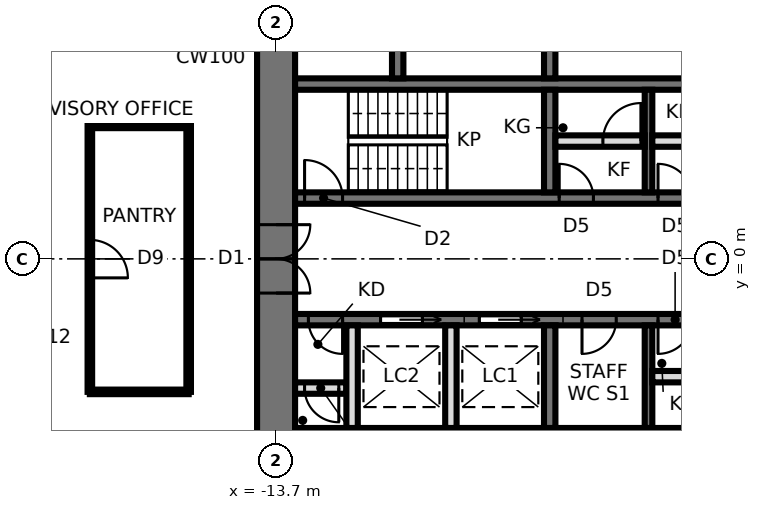
"""IFC4 building model, lengths in metres.
Left out: names, types, materials, properties, quantities, classifications, styles, units other than length and angle.
Written with IfcOpenShell. Run it as: python <this file> out.ifc"""

import sys

from ifc_helpers import new_model, si_unit, direction, frame, frame_2d, origin, place, context, subcontext, project, spatial, rectangle, extrude, element, fill, save


model = new_model("IFC4")
c1 = context("Model", 3, precision=1e-05, world=origin(), true_north=direction((0.0, 1.0)))
c2 = subcontext(c1, "Body", "Model", "MODEL_VIEW")
j1 = project(units=[si_unit("LENGTHUNIT", "METRE"), si_unit("PLANEANGLEUNIT", "RADIAN")], contexts=[c1])
p1 = place(None, origin())
s1 = spatial("IfcSite", under=j1, at=p1, CompositionType="ELEMENT")
p2 = place(p1, origin())
s2 = spatial("IfcBuilding", under=s1, at=p2, CompositionType="ELEMENT")
p3 = place(p2, frame((0.0, 0.0, 187.7)))
s3 = spatial("IfcBuildingStorey", under=s2, at=p3, CompositionType="ELEMENT", Elevation=187.7)
p4 = place(p3, frame((-13.7, 9.5, 0.0), z_axis=(0.0, 0.0, 1.0), x_axis=(0.0, -1.0, 0.0)))
e1 = element("IfcWall", 1, at=p4, inside=s3, PredefinedType="SHEAR", context=c2, shape_type="SweptSolid", body=[
    extrude(rectangle(XDim=19.0, YDim=1.0, at=frame_2d((9.5, 0.0))), origin(), (0.0, 0.0, 1.0), 3.9),
])
p5 = place(p4, frame((8.6, 0.0, 0.0)))
e2 = element("IfcOpeningElement", 2, at=p5, cuts=e1, PredefinedType="OPENING", context=c2, shape_type="SweptSolid", body=[
    extrude(rectangle(XDim=1.8, YDim=2.4, at=frame_2d((0.9, 1.2))), frame((0.0, 0.51, 0.0), z_axis=(0.0, -1.0, 0.0), x_axis=(1.0, 0.0, 0.0)), (0.0, 0.0, 1.0), 1.02),
])
p6 = place(p3, frame((-13.2, 1.6, 0.0), z_axis=(0.0, 0.0, 1.0), x_axis=(1.0, 0.0, 0.0)))
e3 = element("IfcWall", 3, at=p6, inside=s3, PredefinedType="SHEAR", context=c2, shape_type="SweptSolid", body=[
    extrude(rectangle(XDim=26.4, YDim=0.3, at=frame_2d((13.2, 0.0))), origin(), (0.0, 0.0, 1.0), 3.9),
])
p7 = place(p6, frame((0.25, 0.0, 0.0)))
e4 = element("IfcOpeningElement", 4, at=p7, cuts=e3, PredefinedType="OPENING", context=c2, shape_type="SweptSolid", body=[
    extrude(rectangle(XDim=1.0, YDim=2.1, at=frame_2d((0.5, 1.05))), frame((0.0, 0.16, 0.0), z_axis=(0.0, -1.0, 0.0), x_axis=(1.0, 0.0, 0.0)), (0.0, 0.0, 1.0), 0.32),
])
p8 = place(p6, frame((23.05, 0.0, 0.0)))
e5 = element("IfcOpeningElement", 5, at=p8, cuts=e3, PredefinedType="OPENING", context=c2, shape_type="SweptSolid", body=[
    extrude(rectangle(XDim=1.1, YDim=2.3, at=frame_2d((0.55, 1.15))), frame((0.0, 0.16, 0.0), z_axis=(0.0, -1.0, 0.0), x_axis=(1.0, 0.0, 0.0)), (0.0, 0.0, 1.0), 0.32),
])
p9 = place(p6, frame((20.25, 0.0, 0.0)))
e6 = element("IfcOpeningElement", 6, at=p9, cuts=e3, PredefinedType="OPENING", context=c2, shape_type="SweptSolid", body=[
    extrude(rectangle(XDim=1.5, YDim=2.4, at=frame_2d((0.75, 1.2))), frame((0.0, 0.16, 0.0), z_axis=(0.0, -1.0, 0.0), x_axis=(1.0, 0.0, 0.0)), (0.0, 0.0, 1.0), 0.32),
])
p10 = place(p6, frame((6.95, 0.0, 0.0)))
e7 = element("IfcOpeningElement", 7, at=p10, cuts=e3, PredefinedType="OPENING", context=c2, shape_type="SweptSolid", body=[
    extrude(rectangle(XDim=0.9, YDim=2.1, at=frame_2d((0.45, 1.05))), frame((0.0, 0.16, 0.0), z_axis=(0.0, -1.0, 0.0), x_axis=(1.0, 0.0, 0.0)), (0.0, 0.0, 1.0), 0.32),
])
p11 = place(p6, frame((9.55, 0.0, 0.0)))
e8 = element("IfcOpeningElement", 8, at=p11, cuts=e3, PredefinedType="OPENING", context=c2, shape_type="SweptSolid", body=[
    extrude(rectangle(XDim=0.9, YDim=2.1, at=frame_2d((0.45, 1.05))), frame((0.0, 0.16, 0.0), z_axis=(0.0, -1.0, 0.0), x_axis=(1.0, 0.0, 0.0)), (0.0, 0.0, 1.0), 0.32),
])
p12 = place(p6, frame((12.15, 0.0, 0.0)))
e9 = element("IfcOpeningElement", 9, at=p12, cuts=e3, PredefinedType="OPENING", context=c2, shape_type="SweptSolid", body=[
    extrude(rectangle(XDim=0.9, YDim=2.1, at=frame_2d((0.45, 1.05))), frame((0.0, 0.16, 0.0), z_axis=(0.0, -1.0, 0.0), x_axis=(1.0, 0.0, 0.0)), (0.0, 0.0, 1.0), 0.32),
])
p13 = place(p6, frame((25.45, 0.0, 0.0)))
e10 = element("IfcOpeningElement", 10, at=p13, cuts=e3, PredefinedType="OPENING", context=c2, shape_type="SweptSolid", body=[
    extrude(rectangle(XDim=0.9, YDim=2.1, at=frame_2d((0.45, 1.05))), frame((0.0, 0.16, 0.0), z_axis=(0.0, -1.0, 0.0), x_axis=(1.0, 0.0, 0.0)), (0.0, 0.0, 1.0), 0.32),
])
p14 = place(p3, frame((-13.2, -1.6, 0.0), z_axis=(0.0, 0.0, 1.0), x_axis=(1.0, 0.0, 0.0)))
e11 = element("IfcWall", 11, at=p14, inside=s3, PredefinedType="SHEAR", context=c2, shape_type="SweptSolid", body=[
    extrude(rectangle(XDim=26.4, YDim=0.3, at=frame_2d((13.2, 0.0))), origin(), (0.0, 0.0, 1.0), 3.9),
])
p15 = place(p14, frame((25.15, 0.0, 0.0)))
e12 = element("IfcOpeningElement", 12, at=p15, cuts=e11, PredefinedType="OPENING", context=c2, shape_type="SweptSolid", body=[
    extrude(rectangle(XDim=1.0, YDim=2.1, at=frame_2d((0.5, 1.05))), frame((0.0, 0.16, 0.0), z_axis=(0.0, -1.0, 0.0), x_axis=(1.0, 0.0, 0.0)), (0.0, 0.0, 1.0), 0.32),
])
p16 = place(p14, frame((7.55, 0.0, 0.0)))
e13 = element("IfcOpeningElement", 13, at=p16, cuts=e11, PredefinedType="OPENING", context=c2, shape_type="SweptSolid", body=[
    extrude(rectangle(XDim=0.9, YDim=2.1, at=frame_2d((0.45, 1.05))), frame((0.0, 0.16, 0.0), z_axis=(0.0, -1.0, 0.0), x_axis=(1.0, 0.0, 0.0)), (0.0, 0.0, 1.0), 0.32),
])
p17 = place(p14, frame((9.55, 0.0, 0.0)))
e14 = element("IfcOpeningElement", 14, at=p17, cuts=e11, PredefinedType="OPENING", context=c2, shape_type="SweptSolid", body=[
    extrude(rectangle(XDim=0.9, YDim=2.1, at=frame_2d((0.45, 1.05))), frame((0.0, 0.16, 0.0), z_axis=(0.0, -1.0, 0.0), x_axis=(1.0, 0.0, 0.0)), (0.0, 0.0, 1.0), 0.32),
])
p18 = place(p14, frame((12.15, 0.0, 0.0)))
e15 = element("IfcOpeningElement", 15, at=p18, cuts=e11, PredefinedType="OPENING", context=c2, shape_type="SweptSolid", body=[
    extrude(rectangle(XDim=0.9, YDim=2.1, at=frame_2d((0.45, 1.05))), frame((0.0, 0.16, 0.0), z_axis=(0.0, -1.0, 0.0), x_axis=(1.0, 0.0, 0.0)), (0.0, 0.0, 1.0), 0.32),
])
p19 = place(p14, frame((15.25, 0.0, 0.0)))
e16 = element("IfcOpeningElement", 16, at=p19, cuts=e11, PredefinedType="OPENING", context=c2, shape_type="SweptSolid", body=[
    extrude(rectangle(XDim=1.1, YDim=2.3, at=frame_2d((0.55, 1.15))), frame((0.0, 0.16, 0.0), z_axis=(0.0, -1.0, 0.0), x_axis=(1.0, 0.0, 0.0)), (0.0, 0.0, 1.0), 0.32),
])
p20 = place(p14, frame((17.85, 0.0, 0.0)))
e17 = element("IfcOpeningElement", 17, at=p20, cuts=e11, PredefinedType="OPENING", context=c2, shape_type="SweptSolid", body=[
    extrude(rectangle(XDim=1.1, YDim=2.3, at=frame_2d((0.55, 1.15))), frame((0.0, 0.16, 0.0), z_axis=(0.0, -1.0, 0.0), x_axis=(1.0, 0.0, 0.0)), (0.0, 0.0, 1.0), 0.32),
])
p21 = place(p14, frame((4.85, 0.0, 0.0)))
e18 = element("IfcOpeningElement", 18, at=p21, cuts=e11, PredefinedType="OPENING", context=c2, shape_type="SweptSolid", body=[
    extrude(rectangle(XDim=1.1, YDim=2.3, at=frame_2d((0.55, 1.15))), frame((0.0, 0.16, 0.0), z_axis=(0.0, -1.0, 0.0), x_axis=(1.0, 0.0, 0.0)), (0.0, 0.0, 1.0), 0.32),
])
p22 = place(p14, frame((2.25, 0.0, 0.0)))
e19 = element("IfcOpeningElement", 19, at=p22, cuts=e11, PredefinedType="OPENING", context=c2, shape_type="SweptSolid", body=[
    extrude(rectangle(XDim=1.1, YDim=2.3, at=frame_2d((0.55, 1.15))), frame((0.0, 0.16, 0.0), z_axis=(0.0, -1.0, 0.0), x_axis=(1.0, 0.0, 0.0)), (0.0, 0.0, 1.0), 0.32),
])
p23 = place(p14, frame((0.35, 0.0, 0.0)))
e20 = element("IfcOpeningElement", 20, at=p23, cuts=e11, PredefinedType="OPENING", context=c2, shape_type="SweptSolid", body=[
    extrude(rectangle(XDim=0.9, YDim=2.1, at=frame_2d((0.45, 1.05))), frame((0.0, 0.16, 0.0), z_axis=(0.0, -1.0, 0.0), x_axis=(1.0, 0.0, 0.0)), (0.0, 0.0, 1.0), 0.32),
])
for number, where, z_axis, x_axis in (
    (21, (-13.2, 4.6, 0.0), (0.0, 0.0, 1.0), (1.0, 0.0, 0.0)),
    (22, (-13.2, -4.6, 0.0), (0.0, 0.0, 1.0), (1.0, 0.0, 0.0)),
):
    element("IfcWall", number, at=place(p3, frame(where, z_axis=z_axis, x_axis=x_axis)), inside=s3, PredefinedType="SHEAR", context=c2, shape_type="SweptSolid", body=[
        extrude(rectangle(XDim=26.4, YDim=0.3, at=frame_2d((13.2, 0.0))), origin(), (0.0, 0.0, 1.0), 3.9),
    ])
p24 = place(p3, frame((-6.5, 1.75, 0.0), z_axis=(0.0, 0.0, 1.0), x_axis=(0.0, 1.0, 0.0)))
e23 = element("IfcWall", 23, at=p24, inside=s3, PredefinedType="SHEAR", context=c2, shape_type="SweptSolid", body=[
    extrude(rectangle(XDim=2.7, YDim=0.3, at=frame_2d((1.35, 0.0))), origin(), (0.0, 0.0, 1.0), 3.9),
])
p25 = place(p3, frame((-6.5, 4.75, 0.0), z_axis=(0.0, 0.0, 1.0), x_axis=(0.0, 1.0, 0.0)))
e24 = element("IfcWall", 24, at=p25, inside=s3, PredefinedType="SHEAR", context=c2, shape_type="SweptSolid", body=[
    extrude(rectangle(XDim=3.75, YDim=0.3, at=frame_2d((1.875, 0.0))), origin(), (0.0, 0.0, 1.0), 3.9),
])
p26 = place(p3, frame((-3.9, 1.75, 0.0), z_axis=(0.0, 0.0, 1.0), x_axis=(0.0, 1.0, 0.0)))
e25 = element("IfcWall", 25, at=p26, inside=s3, PredefinedType="SHEAR", context=c2, shape_type="SweptSolid", body=[
    extrude(rectangle(XDim=2.7, YDim=0.2, at=frame_2d((1.35, 0.0))), origin(), (0.0, 0.0, 1.0), 3.9),
])
p27 = place(p3, frame((-6.5, -1.75, 0.0), z_axis=(0.0, 0.0, 1.0), x_axis=(0.0, -1.0, 0.0)))
e26 = element("IfcWall", 26, at=p27, inside=s3, PredefinedType="SHEAR", context=c2, shape_type="SweptSolid", body=[
    extrude(rectangle(XDim=2.7, YDim=0.3, at=frame_2d((1.35, 0.0))), origin(), (0.0, 0.0, 1.0), 3.9),
])
p28 = place(p3, frame((-3.9, -1.75, 0.0), z_axis=(0.0, 0.0, 1.0), x_axis=(0.0, -1.0, 0.0)))
e27 = element("IfcWall", 27, at=p28, inside=s3, PredefinedType="SHEAR", context=c2, shape_type="SweptSolid", body=[
    extrude(rectangle(XDim=2.7, YDim=0.2, at=frame_2d((1.35, 0.0))), origin(), (0.0, 0.0, 1.0), 3.9),
])
p29 = place(p3, frame((-10.5, 4.75, 0.0), z_axis=(0.0, 0.0, 1.0), x_axis=(0.0, 1.0, 0.0)))
e28 = element("IfcWall", 28, at=p29, inside=s3, PredefinedType="SHEAR", context=c2, shape_type="SweptSolid", body=[
    extrude(rectangle(XDim=3.75, YDim=0.3, at=frame_2d((1.875, 0.0))), origin(), (0.0, 0.0, 1.0), 3.9),
])
p30 = place(p3, frame((-6.35, 3.1, 0.0), z_axis=(0.0, 0.0, 1.0), x_axis=(1.0, 0.0, 0.0)))
e29 = element("IfcWall", 29, at=p30, inside=s3, PredefinedType="PARTITIONING", context=c2, shape_type="SweptSolid", body=[
    extrude(rectangle(XDim=2.35, YDim=0.3, at=frame_2d((1.175, 0.0))), origin(), (0.0, 0.0, 1.0), 3.74),
])
p31 = place(p30, frame((1.25, 0.0, 0.0)))
e30 = element("IfcOpeningElement", 30, at=p31, cuts=e29, PredefinedType="OPENING", context=c2, shape_type="SweptSolid", body=[
    extrude(rectangle(XDim=1.0, YDim=2.4, at=frame_2d((0.5, 1.2))), frame((0.0, 0.16, 0.0), z_axis=(0.0, -1.0, 0.0), x_axis=(1.0, 0.0, 0.0)), (0.0, 0.0, 1.0), 0.32),
])
p32 = place(p3, frame((-3.8, 3.1, 0.0), z_axis=(0.0, 0.0, 1.0), x_axis=(1.0, 0.0, 0.0)))
e31 = element("IfcWall", 31, at=p32, inside=s3, PredefinedType="PARTITIONING", context=c2, shape_type="SweptSolid", body=[
    extrude(rectangle(XDim=2.4, YDim=0.3, at=frame_2d((1.2, 0.0))), origin(), (0.0, 0.0, 1.0), 3.74),
])
p33 = place(p32, frame((1.3, 0.0, 0.0)))
e32 = element("IfcOpeningElement", 32, at=p33, cuts=e31, PredefinedType="OPENING", context=c2, shape_type="SweptSolid", body=[
    extrude(rectangle(XDim=1.0, YDim=2.4, at=frame_2d((0.5, 1.2))), frame((0.0, 0.16, 0.0), z_axis=(0.0, -1.0, 0.0), x_axis=(1.0, 0.0, 0.0)), (0.0, 0.0, 1.0), 0.32),
])
p34 = place(p3, frame((-3.8, -3.1, 0.0), z_axis=(0.0, 0.0, 1.0), x_axis=(1.0, 0.0, 0.0)))
e33 = element("IfcWall", 33, at=p34, inside=s3, PredefinedType="PARTITIONING", context=c2, shape_type="SweptSolid", body=[
    extrude(rectangle(XDim=2.4, YDim=0.3, at=frame_2d((1.2, 0.0))), origin(), (0.0, 0.0, 1.0), 3.74),
])
p35 = place(p34, frame((1.3, 0.0, 0.0)))
e34 = element("IfcOpeningElement", 34, at=p35, cuts=e33, PredefinedType="OPENING", context=c2, shape_type="SweptSolid", body=[
    extrude(rectangle(XDim=1.0, YDim=2.4, at=frame_2d((0.5, 1.2))), frame((0.0, 0.16, 0.0), z_axis=(0.0, -1.0, 0.0), x_axis=(1.0, 0.0, 0.0)), (0.0, 0.0, 1.0), 0.32),
])
p36 = place(p3, frame((-13.2, -3.4, 0.0), z_axis=(0.0, 0.0, 1.0), x_axis=(1.0, 0.0, 0.0)))
e35 = element("IfcWall", 35, at=p36, inside=s3, PredefinedType="SOLIDWALL", context=c2, shape_type="SweptSolid", body=[
    extrude(rectangle(XDim=1.35, YDim=0.3, at=frame_2d((0.675, 0.0))), origin(), (0.0, 0.0, 1.0), 3.74),
])
p37 = place(p36, frame((0.25, 0.0, 0.0)))
e36 = element("IfcOpeningElement", 36, at=p37, cuts=e35, PredefinedType="OPENING", context=c2, shape_type="SweptSolid", body=[
    extrude(rectangle(XDim=0.9, YDim=2.1, at=frame_2d((0.45, 1.05))), frame((0.0, 0.16, 0.0), z_axis=(0.0, -1.0, 0.0), x_axis=(1.0, 0.0, 0.0)), (0.0, 0.0, 1.0), 0.32),
])
for number, where, z_axis, x_axis in (
    (37, (-9.1, -1.75, 0.0), (0.0, 0.0, 1.0), (0.0, -1.0, 0.0)),
    (38, (-11.7, -1.75, 0.0), (0.0, 0.0, 1.0), (0.0, -1.0, 0.0)),
):
    element("IfcWall", number, at=place(p3, frame(where, z_axis=z_axis, x_axis=x_axis)), inside=s3, PredefinedType="SOLIDWALL", context=c2, shape_type="SweptSolid", body=[
        extrude(rectangle(XDim=2.7, YDim=0.3, at=frame_2d((1.35, 0.0))), origin(), (0.0, 0.0, 1.0), 3.74),
    ])
for number, where, z_axis, x_axis in (
    (39, (-16.0, -3.5, 0.0), (0.0, 0.0, 1.0), (-1.0, 0.0, 0.0)),
    (40, (-18.6, 3.5, 0.0), (0.0, 0.0, 1.0), (1.0, 0.0, 0.0)),
):
    element("IfcWall", number, at=place(p3, frame(where, z_axis=z_axis, x_axis=x_axis)), inside=s3, PredefinedType="PARTITIONING", context=c2, shape_type="SweptSolid", body=[
        extrude(rectangle(XDim=2.6, YDim=0.12, at=frame_2d((1.3, 0.0))), origin(), (0.0, 0.0, 1.0), 3.74),
    ])
p38 = place(p3, frame((-18.6, -3.5, 0.0), z_axis=(0.0, 0.0, 1.0), x_axis=(0.0, 1.0, 0.0)))
e41 = element("IfcWall", 41, at=p38, inside=s3, PredefinedType="PARTITIONING", context=c2, shape_type="SweptSolid", body=[
    extrude(rectangle(XDim=7.0, YDim=0.12, at=frame_2d((3.5, 0.0))), origin(), (0.0, 0.0, 1.0), 3.334),
])
p39 = place(p38, frame((3.0, 0.0, 0.0)))
e42 = element("IfcOpeningElement", 42, at=p39, cuts=e41, PredefinedType="OPENING", context=c2, shape_type="SweptSolid", body=[
    extrude(rectangle(XDim=1.0, YDim=2.4, at=frame_2d((0.5, 1.2))), frame((0.0, 0.07, 0.0), z_axis=(0.0, -1.0, 0.0), x_axis=(1.0, 0.0, 0.0)), (0.0, 0.0, 1.0), 0.14),
])
p40 = place(p3, frame((-16.0, 3.5, 0.0), z_axis=(0.0, 0.0, 1.0), x_axis=(0.0, -1.0, 0.0)))
e43 = element("IfcWall", 43, at=p40, inside=s3, PredefinedType="PARTITIONING", context=c2, shape_type="SweptSolid", body=[
    extrude(rectangle(XDim=7.0, YDim=0.12, at=frame_2d((3.5, 0.0))), origin(), (0.0, 0.0, 1.0), 3.74),
])
p41 = place(p5, origin())
e44 = element("IfcDoor", 44, at=p41, inside=s3, OperationType="DOUBLE_DOOR_SINGLE_SWING", PredefinedType="DOOR", context=c2, shape_type="SweptSolid", body=[
    extrude(rectangle(XDim=1.72, YDim=2.36, at=frame_2d((0.9, 1.18))), frame((0.0, 0.025, 0.0), z_axis=(0.0, -1.0, 0.0), x_axis=(1.0, 0.0, 0.0)), (0.0, 0.0, 1.0), 0.05),
    extrude(rectangle(XDim=0.04, YDim=2.4, at=frame_2d((0.02, 1.2))), frame((0.0, 0.25, 0.0), z_axis=(0.0, -1.0, 0.0), x_axis=(1.0, 0.0, 0.0)), (0.0, 0.0, 1.0), 0.5),
    extrude(rectangle(XDim=0.04, YDim=2.4, at=frame_2d((1.78, 1.2))), frame((0.0, 0.25, 0.0), z_axis=(0.0, -1.0, 0.0), x_axis=(1.0, 0.0, 0.0)), (0.0, 0.0, 1.0), 0.5),
    extrude(rectangle(XDim=1.72, YDim=0.04, at=frame_2d((0.9, 2.38))), frame((0.0, 0.25, 0.0), z_axis=(0.0, -1.0, 0.0), x_axis=(1.0, 0.0, 0.0)), (0.0, 0.0, 1.0), 0.5),
])
fill(e2, e44)
p42 = place(p7, origin())
e45 = element("IfcDoor", 45, at=p42, inside=s3, OperationType="SINGLE_SWING_LEFT", PredefinedType="DOOR", context=c2, shape_type="SweptSolid", body=[
    extrude(rectangle(XDim=1.0, YDim=2.1, at=frame_2d((0.5, 1.05))), frame((0.0, 0.025, 0.0), z_axis=(0.0, -1.0, 0.0), x_axis=(1.0, 0.0, 0.0)), (0.0, 0.0, 1.0), 0.05),
])
fill(e4, e45)
p43 = place(p31, origin())
e46 = element("IfcDoor", 46, at=p43, inside=s3, OperationType="SINGLE_SWING_RIGHT", PredefinedType="DOOR", context=c2, shape_type="SweptSolid", body=[
    extrude(rectangle(XDim=1.0, YDim=2.4, at=frame_2d((0.5, 1.2))), frame((0.0, 0.025, 0.0), z_axis=(0.0, -1.0, 0.0), x_axis=(1.0, 0.0, 0.0)), (0.0, 0.0, 1.0), 0.05),
])
fill(e30, e46)
p44 = place(p10, origin())
e47 = element("IfcDoor", 47, at=p44, inside=s3, OperationType="SINGLE_SWING_LEFT", PredefinedType="DOOR", context=c2, shape_type="SweptSolid", body=[
    extrude(rectangle(XDim=0.9, YDim=2.1, at=frame_2d((0.45, 1.05))), frame((0.0, 0.025, 0.0), z_axis=(0.0, -1.0, 0.0), x_axis=(1.0, 0.0, 0.0)), (0.0, 0.0, 1.0), 0.05),
])
fill(e7, e47)
p45 = place(p11, origin())
e48 = element("IfcDoor", 48, at=p45, inside=s3, OperationType="SINGLE_SWING_LEFT", PredefinedType="DOOR", context=c2, shape_type="SweptSolid", body=[
    extrude(rectangle(XDim=0.9, YDim=2.1, at=frame_2d((0.45, 1.05))), frame((0.0, 0.025, 0.0), z_axis=(0.0, -1.0, 0.0), x_axis=(1.0, 0.0, 0.0)), (0.0, 0.0, 1.0), 0.05),
])
fill(e8, e48)
p46 = place(p16, frame((0.9, 0.0, 0.0), z_axis=(0.0, 0.0, 1.0), x_axis=(-1.0, 0.0, 0.0)))
e49 = element("IfcDoor", 49, at=p46, inside=s3, OperationType="SINGLE_SWING_RIGHT", PredefinedType="DOOR", context=c2, shape_type="SweptSolid", body=[
    extrude(rectangle(XDim=0.9, YDim=2.1, at=frame_2d((0.45, 1.05))), frame((0.0, 0.025, 0.0), z_axis=(0.0, -1.0, 0.0), x_axis=(1.0, 0.0, 0.0)), (0.0, 0.0, 1.0), 0.05),
])
fill(e13, e49)
p47 = place(p17, frame((0.9, 0.0, 0.0), z_axis=(0.0, 0.0, 1.0), x_axis=(-1.0, 0.0, 0.0)))
e50 = element("IfcDoor", 50, at=p47, inside=s3, OperationType="SINGLE_SWING_RIGHT", PredefinedType="DOOR", context=c2, shape_type="SweptSolid", body=[
    extrude(rectangle(XDim=0.9, YDim=2.1, at=frame_2d((0.45, 1.05))), frame((0.0, 0.025, 0.0), z_axis=(0.0, -1.0, 0.0), x_axis=(1.0, 0.0, 0.0)), (0.0, 0.0, 1.0), 0.05),
])
fill(e14, e50)
p48 = place(p21, frame((1.1, 0.0, 0.0), z_axis=(0.0, 0.0, 1.0), x_axis=(-1.0, 0.0, 0.0)))
e51 = element("IfcDoor", 51, at=p48, inside=s3, OperationType="SLIDING_TO_LEFT", PredefinedType="DOOR", context=c2, shape_type="SweptSolid", body=[
    extrude(rectangle(XDim=1.1, YDim=2.3, at=frame_2d((0.55, 1.15))), frame((0.0, 0.025, 0.0), z_axis=(0.0, -1.0, 0.0), x_axis=(1.0, 0.0, 0.0)), (0.0, 0.0, 1.0), 0.05),
])
fill(e18, e51)
p49 = place(p22, frame((1.1, 0.0, 0.0), z_axis=(0.0, 0.0, 1.0), x_axis=(-1.0, 0.0, 0.0)))
e52 = element("IfcDoor", 52, at=p49, inside=s3, OperationType="SLIDING_TO_LEFT", PredefinedType="DOOR", context=c2, shape_type="SweptSolid", body=[
    extrude(rectangle(XDim=1.1, YDim=2.3, at=frame_2d((0.55, 1.15))), frame((0.0, 0.025, 0.0), z_axis=(0.0, -1.0, 0.0), x_axis=(1.0, 0.0, 0.0)), (0.0, 0.0, 1.0), 0.05),
])
fill(e19, e52)
p50 = place(p23, frame((0.9, 0.0, 0.0), z_axis=(0.0, 0.0, 1.0), x_axis=(-1.0, 0.0, 0.0)))
e53 = element("IfcDoor", 53, at=p50, inside=s3, OperationType="SINGLE_SWING_LEFT", PredefinedType="DOOR", context=c2, shape_type="SweptSolid", body=[
    extrude(rectangle(XDim=0.9, YDim=2.1, at=frame_2d((0.45, 1.05))), frame((0.0, 0.025, 0.0), z_axis=(0.0, -1.0, 0.0), x_axis=(1.0, 0.0, 0.0)), (0.0, 0.0, 1.0), 0.05),
])
fill(e20, e53)
p51 = place(p37, frame((0.9, 0.0, 0.0), z_axis=(0.0, 0.0, 1.0), x_axis=(-1.0, 0.0, 0.0)))
e54 = element("IfcDoor", 54, at=p51, inside=s3, OperationType="SINGLE_SWING_LEFT", PredefinedType="DOOR", context=c2, shape_type="SweptSolid", body=[
    extrude(rectangle(XDim=0.9, YDim=2.1, at=frame_2d((0.45, 1.05))), frame((0.0, 0.025, 0.0), z_axis=(0.0, -1.0, 0.0), x_axis=(1.0, 0.0, 0.0)), (0.0, 0.0, 1.0), 0.05),
])
fill(e36, e54)
p52 = place(p39, frame((1.0, 0.0, 0.0), z_axis=(0.0, 0.0, 1.0), x_axis=(-1.0, 0.0, 0.0)))
e55 = element("IfcDoor", 55, at=p52, inside=s3, OperationType="SINGLE_SWING_RIGHT", PredefinedType="DOOR", context=c2, shape_type="SweptSolid", body=[
    extrude(rectangle(XDim=1.0, YDim=2.4, at=frame_2d((0.5, 1.2))), frame((0.0, 0.025, 0.0), z_axis=(0.0, -1.0, 0.0), x_axis=(1.0, 0.0, 0.0)), (0.0, 0.0, 1.0), 0.05),
])
fill(e42, e55)
save(model, sys.argv[1])
